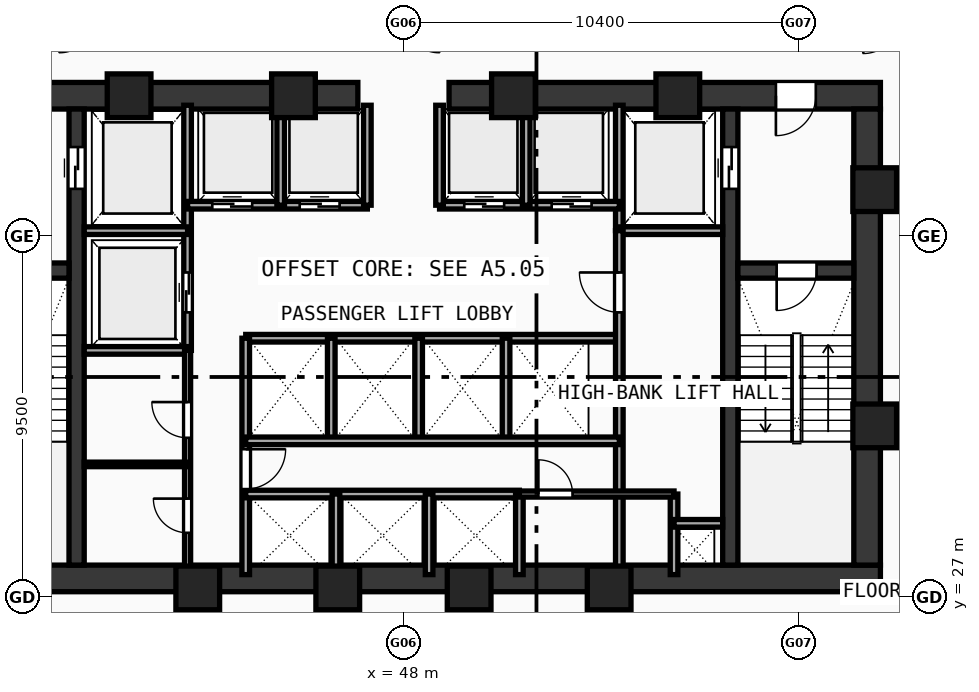
"""IFC4 building model, lengths in metres.
Left out: names, types, materials, properties, quantities, classifications, styles, units other than length and angle.
Written with IfcOpenShell. Run it as: python <this file> out.ifc"""

import sys

from ifc_helpers import new_model, si_unit, direction, frame, frame_2d, origin, origin_with_axes, origin_2d, place, context, subcontext, project, spatial, rectangle, hollow_rectangle, extrude, source, transform, mapped, element, fill, save


model = new_model("IFC4")
c1 = context("Model", 3, precision=1e-05, world=origin(), true_north=direction((0.0, 1.0)))
c2 = subcontext(c1, "Body", "Model", "MODEL_VIEW")
j1 = project(units=[si_unit("LENGTHUNIT", "METRE"), si_unit("PLANEANGLEUNIT", "RADIAN")], contexts=[c1])
p1 = place(None, origin())
s1 = spatial("IfcSite", under=j1, at=p1, CompositionType="ELEMENT")
p2 = place(p1, origin())
s2 = spatial("IfcBuilding", under=s1, at=p2, CompositionType="ELEMENT")
p3 = place(p2, frame((0.0, 0.0, 44.92)))
s3 = spatial("IfcBuildingStorey", under=s2, at=p3, CompositionType="ELEMENT", Elevation=44.92)
p4 = place(p3, frame((35.45, 27.5, 0.0), z_axis=(0.0, 0.0, 1.0), x_axis=(1.0, 0.0, 0.0)))
e1 = element("IfcWall", 1, at=p4, inside=s3, PredefinedType="SHEAR", context=c2, shape_type="SweptSolid", body=[
    extrude(rectangle(XDim=25.1, YDim=0.7, at=frame_2d((12.55, 0.0))), origin(), (0.0, 0.0, 1.0), 3.37),
])
p5 = place(p3, frame((35.45, 40.2, 0.0), z_axis=(0.0, 0.0, 1.0), x_axis=(1.0, 0.0, 0.0)))
e2 = element("IfcWall", 2, at=p5, inside=s3, PredefinedType="SHEAR", context=c2, shape_type="SweptSolid", body=[
    extrude(rectangle(XDim=11.35, YDim=0.7, at=frame_2d((5.675, 0.0))), origin(), (0.0, 0.0, 1.0), 3.37),
])
p6 = place(p5, frame((1.7, 0.0, 0.0)))
e3 = element("IfcOpeningElement", 3, at=p6, cuts=e2, PredefinedType="OPENING", context=c2, shape_type="SweptSolid", body=[
    extrude(rectangle(XDim=1.05, YDim=2.1, at=frame_2d((0.525, 1.05))), frame((0.0, 0.36, 0.0), z_axis=(0.0, -1.0, 0.0), x_axis=(1.0, 0.0, 0.0)), (0.0, 0.0, 1.0), 0.72),
])
p7 = place(p3, frame((49.2, 40.2, 0.0), z_axis=(0.0, 0.0, 1.0), x_axis=(1.0, 0.0, 0.0)))
e4 = element("IfcWall", 4, at=p7, inside=s3, PredefinedType="SHEAR", context=c2, shape_type="SweptSolid", body=[
    extrude(rectangle(XDim=11.35, YDim=0.7, at=frame_2d((5.675, 0.0))), origin(), (0.0, 0.0, 1.0), 3.37),
])
p8 = place(p7, frame((8.6, 0.0, 0.0)))
e5 = element("IfcOpeningElement", 5, at=p8, cuts=e4, PredefinedType="OPENING", context=c2, shape_type="SweptSolid", body=[
    extrude(rectangle(XDim=1.05, YDim=2.1, at=frame_2d((0.525, 1.05))), frame((0.0, 0.36, 0.0), z_axis=(0.0, -1.0, 0.0), x_axis=(1.0, 0.0, 0.0)), (0.0, 0.0, 1.0), 0.72),
])
p9 = place(p3, frame((60.2, 27.85, 0.0), z_axis=(0.0, 0.0, 1.0), x_axis=(0.0, 1.0, 0.0)))
e6 = element("IfcWall", 6, at=p9, inside=s3, PredefinedType="SHEAR", context=c2, shape_type="SweptSolid", body=[
    extrude(rectangle(XDim=12.0, YDim=0.7, at=frame_2d((6.0, 0.0))), origin(), (0.0, 0.0, 1.0), 3.37),
])
p10 = place(p3, frame((39.4, 27.85, 0.0), z_axis=(0.0, 0.0, 1.0), x_axis=(0.0, 1.0, 0.0)))
e7 = element("IfcWall", 7, at=p10, inside=s3, PredefinedType="SHEAR", context=c2, shape_type="SweptSolid", body=[
    extrude(rectangle(XDim=12.0, YDim=0.4, at=frame_2d((6.0, 0.0))), origin(), (0.0, 0.0, 1.0), 3.37),
])
p11 = place(p10, frame((9.9, 0.0, 0.0)))
e8 = element("IfcOpeningElement", 8, at=p11, cuts=e7, PredefinedType="OPENING", context=c2, shape_type="SweptSolid", body=[
    extrude(rectangle(XDim=1.1, YDim=2.1, at=frame_2d((0.55, 1.05))), frame((0.0, 0.21, 0.0), z_axis=(0.0, -1.0, 0.0), x_axis=(1.0, 0.0, 0.0)), (0.0, 0.0, 1.0), 0.42),
])
p12 = place(p3, frame((56.6, 27.85, 0.0), z_axis=(0.0, 0.0, 1.0), x_axis=(0.0, 1.0, 0.0)))
e9 = element("IfcWall", 9, at=p12, inside=s3, PredefinedType="SHEAR", context=c2, shape_type="SweptSolid", body=[
    extrude(rectangle(XDim=12.0, YDim=0.4, at=frame_2d((6.0, 0.0))), origin(), (0.0, 0.0, 1.0), 3.37),
])
p13 = place(p12, frame((9.9, 0.0, 0.0)))
e10 = element("IfcOpeningElement", 10, at=p13, cuts=e9, PredefinedType="OPENING", context=c2, shape_type="SweptSolid", body=[
    extrude(rectangle(XDim=1.1, YDim=2.1, at=frame_2d((0.55, 1.05))), frame((0.0, 0.21, 0.0), z_axis=(0.0, -1.0, 0.0), x_axis=(1.0, 0.0, 0.0)), (0.0, 0.0, 1.0), 0.42),
])
p14 = place(p3, frame((36.15, 35.6, 0.0), z_axis=(0.0, 0.0, 1.0), x_axis=(1.0, 0.0, 0.0)))
e11 = element("IfcWall", 11, at=p14, inside=s3, PredefinedType="SHEAR", context=c2, shape_type="SweptSolid", body=[
    extrude(rectangle(XDim=3.05, YDim=0.4, at=frame_2d((1.525, 0.0))), origin(), (0.0, 0.0, 1.0), 3.37),
])
p15 = place(p14, frame((0.97, 0.0, 0.0)))
e12 = element("IfcOpeningElement", 12, at=p15, cuts=e11, PredefinedType="OPENING", context=c2, shape_type="SweptSolid", body=[
    extrude(rectangle(XDim=1.05, YDim=2.1, at=frame_2d((0.525, 1.05))), frame((0.0, 0.21, 0.0), z_axis=(0.0, -1.0, 0.0), x_axis=(1.0, 0.0, 0.0)), (0.0, 0.0, 1.0), 0.42),
])
p16 = place(p3, frame((56.8, 35.6, 0.0), z_axis=(0.0, 0.0, 1.0), x_axis=(1.0, 0.0, 0.0)))
e13 = element("IfcWall", 13, at=p16, inside=s3, PredefinedType="SHEAR", context=c2, shape_type="SweptSolid", body=[
    extrude(rectangle(XDim=3.05, YDim=0.4, at=frame_2d((1.525, 0.0))), origin(), (0.0, 0.0, 1.0), 3.37),
])
p17 = place(p16, frame((1.02, 0.0, 0.0)))
e14 = element("IfcOpeningElement", 14, at=p17, cuts=e13, PredefinedType="OPENING", context=c2, shape_type="SweptSolid", body=[
    extrude(rectangle(XDim=1.05, YDim=2.1, at=frame_2d((0.525, 1.05))), frame((0.0, 0.21, 0.0), z_axis=(0.0, -1.0, 0.0), x_axis=(1.0, 0.0, 0.0)), (0.0, 0.0, 1.0), 0.42),
])
m1 = source(origin(), c2, "Body", "SweptSolid", [
    extrude(hollow_rectangle(XDim=1.15, YDim=1.15, WallThickness=0.048, at=origin_2d()), origin(), (0.0, 0.0, 1.0), 3.63),
])
for number, where, z_axis, x_axis in (
    (15, (42.588, 27.25, -0.26), (0.0, 0.0, 1.0), (1.0, 0.0, 0.0)),
    (16, (46.272, 27.25, -0.26), (0.0, 0.0, 1.0), (1.0, 0.0, 0.0)),
    (17, (49.729, 27.25, -0.26), (0.0, 0.0, 1.0), (1.0, 0.0, 0.0)),
    (18, (53.412, 27.25, -0.26), (0.0, 0.0, 1.0), (1.0, 0.0, 0.0)),
    (19, (60.4, 31.513, -0.26), (0.0, 0.0, 1.0), (1.0, 0.0, 0.0)),
    (20, (60.4, 37.729, -0.26), (0.0, 0.0, 1.0), (1.0, 0.0, 0.0)),
    (21, (55.219, 40.2, -0.26), (0.0, 0.0, 1.0), (1.0, 0.0, 0.0)),
    (22, (50.894, 40.2, -0.26), (0.0, 0.0, 1.0), (1.0, 0.0, 0.0)),
    (23, (45.106, 40.2, -0.26), (0.0, 0.0, 1.0), (1.0, 0.0, 0.0)),
    (24, (40.781, 40.2, -0.26), (0.0, 0.0, 1.0), (1.0, 0.0, 0.0)),
):
    element("IfcColumn", number, at=place(p3, frame(where, z_axis=z_axis, x_axis=x_axis)), inside=s3, PredefinedType="COLUMN", context=c2, shape_type="MappedRepresentation", body=[
        mapped(m1, transform((0.0, 0.0, 0.0), scale=1.0)),
    ])
p18 = place(p3, frame((42.32, 33.5, 0.0), z_axis=(0.0, 0.0, 1.0), x_axis=(0.0, 1.0, 0.0)))
e25 = element("IfcWall", 25, at=p18, inside=s3, PredefinedType="SOLIDWALL", context=c2, shape_type="SweptSolid", body=[
    extrude(rectangle(XDim=6.45, YDim=0.2, at=frame_2d((3.225, 0.0))), origin(), (0.0, 0.0, 1.0), 3.37),
])
p19 = place(p18, frame((1.0, 0.0, 0.0)))
e26 = element("IfcOpeningElement", 26, at=p19, cuts=e25, PredefinedType="OPENING", context=c2, shape_type="SweptSolid", body=[
    extrude(rectangle(XDim=1.05, YDim=2.1, at=frame_2d((0.525, 1.05))), frame((0.0, 0.11, 0.0), z_axis=(0.0, -1.0, 0.0), x_axis=(1.0, 0.0, 0.0)), (0.0, 0.0, 1.0), 0.22),
])
for number, where, z_axis, x_axis in (
    (27, (39.6, 36.65, 0.0), (0.0, 0.0, 1.0), (1.0, 0.0, 0.0)),
    (28, (39.6, 33.5, 0.0), (0.0, 0.0, 1.0), (1.0, 0.0, 0.0)),
):
    element("IfcWall", number, at=place(p3, frame(where, z_axis=z_axis, x_axis=x_axis)), inside=s3, PredefinedType="SOLIDWALL", context=c2, shape_type="SweptSolid", body=[
        extrude(rectangle(XDim=2.72, YDim=0.2, at=frame_2d((1.36, 0.0))), origin(), (0.0, 0.0, 1.0), 3.37),
    ])
p20 = place(p3, frame((53.68, 36.65, 0.0), z_axis=(0.0, 0.0, 1.0), x_axis=(0.0, 1.0, 0.0)))
e29 = element("IfcWall", 29, at=p20, inside=s3, PredefinedType="SOLIDWALL", context=c2, shape_type="SweptSolid", body=[
    extrude(rectangle(XDim=3.3, YDim=0.2, at=frame_2d((1.65, 0.0))), origin(), (0.0, 0.0, 1.0), 3.37),
])
p21 = place(p3, frame((53.68, 36.65, 0.0), z_axis=(0.0, 0.0, 1.0), x_axis=(1.0, 0.0, 0.0)))
e30 = element("IfcWall", 30, at=p21, inside=s3, PredefinedType="SOLIDWALL", context=c2, shape_type="SweptSolid", body=[
    extrude(rectangle(XDim=2.72, YDim=0.2, at=frame_2d((1.36, 0.0))), origin(), (0.0, 0.0, 1.0), 3.37),
])
p22 = place(p3, frame((42.32, 37.32, 0.0), z_axis=(0.0, 0.0, 1.0), x_axis=(1.0, 0.0, 0.0)))
e31 = element("IfcWall", 31, at=p22, inside=s3, PredefinedType="SOLIDWALL", context=c2, shape_type="SweptSolid", body=[
    extrude(rectangle(XDim=4.73, YDim=0.2, at=frame_2d((2.365, 0.0))), origin(), (0.0, 0.0, 1.0), 3.37),
])
p23 = place(p22, frame((0.65, 0.0, 0.0)))
e32 = element("IfcOpeningElement", 32, at=p23, cuts=e31, PredefinedType="OPENING", context=c2, shape_type="SweptSolid", body=[
    extrude(rectangle(XDim=1.05, YDim=2.1, at=frame_2d((0.525, 1.05))), frame((0.0, 0.11, 0.0), z_axis=(0.0, -1.0, 0.0), x_axis=(1.0, 0.0, 0.0)), (0.0, 0.0, 1.0), 0.22),
])
p24 = place(p22, frame((2.95, 0.0, 0.0)))
e33 = element("IfcOpeningElement", 33, at=p24, cuts=e31, PredefinedType="OPENING", context=c2, shape_type="SweptSolid", body=[
    extrude(rectangle(XDim=1.05, YDim=2.1, at=frame_2d((0.525, 1.05))), frame((0.0, 0.11, 0.0), z_axis=(0.0, -1.0, 0.0), x_axis=(1.0, 0.0, 0.0)), (0.0, 0.0, 1.0), 0.22),
])
p25 = place(p3, frame((48.95, 37.32, 0.0), z_axis=(0.0, 0.0, 1.0), x_axis=(1.0, 0.0, 0.0)))
e34 = element("IfcWall", 34, at=p25, inside=s3, PredefinedType="SOLIDWALL", context=c2, shape_type="SweptSolid", body=[
    extrude(rectangle(XDim=4.73, YDim=0.2, at=frame_2d((2.365, 0.0))), origin(), (0.0, 0.0, 1.0), 3.37),
])
p26 = place(p25, frame((0.65, 0.0, 0.0)))
e35 = element("IfcOpeningElement", 35, at=p26, cuts=e34, PredefinedType="OPENING", context=c2, shape_type="SweptSolid", body=[
    extrude(rectangle(XDim=1.05, YDim=2.1, at=frame_2d((0.525, 1.05))), frame((0.0, 0.11, 0.0), z_axis=(0.0, -1.0, 0.0), x_axis=(1.0, 0.0, 0.0)), (0.0, 0.0, 1.0), 0.22),
])
p27 = place(p25, frame((2.95, 0.0, 0.0)))
e36 = element("IfcOpeningElement", 36, at=p27, cuts=e34, PredefinedType="OPENING", context=c2, shape_type="SweptSolid", body=[
    extrude(rectangle(XDim=1.05, YDim=2.1, at=frame_2d((0.525, 1.05))), frame((0.0, 0.11, 0.0), z_axis=(0.0, -1.0, 0.0), x_axis=(1.0, 0.0, 0.0)), (0.0, 0.0, 1.0), 0.22),
])
for number, where, z_axis, x_axis in (
    (37, (47.05, 37.32, 0.0), (0.0, 0.0, 1.0), (0.0, 1.0, 0.0)),
    (38, (48.95, 37.32, 0.0), (0.0, 0.0, 1.0), (0.0, 1.0, 0.0)),
    (39, (44.77, 37.32, 0.0), (0.0, 0.0, 1.0), (0.0, 1.0, 0.0)),
    (40, (51.23, 37.32, 0.0), (0.0, 0.0, 1.0), (0.0, 1.0, 0.0)),
):
    element("IfcWall", number, at=place(p3, frame(where, z_axis=z_axis, x_axis=x_axis)), inside=s3, PredefinedType="SOLIDWALL", context=c2, shape_type="SweptSolid", body=[
        extrude(rectangle(XDim=2.63, YDim=0.2, at=frame_2d((1.315, 0.0))), origin(), (0.0, 0.0, 1.0), 3.37),
    ])
p28 = place(p3, frame((43.85, 33.82, 0.0), z_axis=(0.0, 0.0, 1.0), x_axis=(1.0, 0.0, 0.0)))
e41 = element("IfcWall", 41, at=p28, inside=s3, PredefinedType="SOLIDWALL", context=c2, shape_type="SweptSolid", body=[
    extrude(rectangle(XDim=9.83, YDim=0.2, at=frame_2d((4.915, 0.0))), origin(), (0.0, 0.0, 1.0), 3.37),
])
p29 = place(p3, frame((43.85, 27.6, 0.0), z_axis=(0.0, 0.0, 1.0), x_axis=(0.0, 1.0, 0.0)))
e42 = element("IfcWall", 42, at=p29, inside=s3, PredefinedType="SOLIDWALL", context=c2, shape_type="SweptSolid", body=[
    extrude(rectangle(XDim=6.22, YDim=0.2, at=frame_2d((3.11, 0.0))), origin(), (0.0, 0.0, 1.0), 3.37),
])
p30 = place(p29, frame((2.25, 0.0, 0.0)))
e43 = element("IfcOpeningElement", 43, at=p30, cuts=e42, PredefinedType="OPENING", context=c2, shape_type="SweptSolid", body=[
    extrude(rectangle(XDim=1.05, YDim=2.1, at=frame_2d((0.525, 1.05))), frame((0.0, 0.11, 0.0), z_axis=(0.0, -1.0, 0.0), x_axis=(1.0, 0.0, 0.0)), (0.0, 0.0, 1.0), 0.22),
])
p31 = place(p3, frame((53.68, 27.6, 0.0), z_axis=(0.0, 0.0, 1.0), x_axis=(0.0, 1.0, 0.0)))
e44 = element("IfcWall", 44, at=p31, inside=s3, PredefinedType="SOLIDWALL", context=c2, shape_type="SweptSolid", body=[
    extrude(rectangle(XDim=9.05, YDim=0.2, at=frame_2d((4.525, 0.0))), origin(), (0.0, 0.0, 1.0), 3.37),
])
p32 = place(p31, frame((6.9, 0.0, 0.0)))
e45 = element("IfcOpeningElement", 45, at=p32, cuts=e44, PredefinedType="OPENING", context=c2, shape_type="SweptSolid", body=[
    extrude(rectangle(XDim=1.05, YDim=2.1, at=frame_2d((0.525, 1.05))), frame((0.0, 0.11, 0.0), z_axis=(0.0, -1.0, 0.0), x_axis=(1.0, 0.0, 0.0)), (0.0, 0.0, 1.0), 0.22),
])
for number, where, z_axis, x_axis in (
    (46, (46.1, 31.12, 0.0), (0.0, 0.0, 1.0), (0.0, 1.0, 0.0)),
    (47, (48.4, 31.12, 0.0), (0.0, 0.0, 1.0), (0.0, 1.0, 0.0)),
    (48, (50.7, 31.12, 0.0), (0.0, 0.0, 1.0), (0.0, 1.0, 0.0)),
):
    element("IfcWall", number, at=place(p3, frame(where, z_axis=z_axis, x_axis=x_axis)), inside=s3, PredefinedType="SOLIDWALL", context=c2, shape_type="SweptSolid", body=[
        extrude(rectangle(XDim=2.7, YDim=0.2, at=frame_2d((1.35, 0.0))), origin(), (0.0, 0.0, 1.0), 3.37),
    ])
p33 = place(p3, frame((43.85, 29.72, 0.0), z_axis=(0.0, 0.0, 1.0), x_axis=(1.0, 0.0, 0.0)))
e49 = element("IfcWall", 49, at=p33, inside=s3, PredefinedType="SOLIDWALL", context=c2, shape_type="SweptSolid", body=[
    extrude(rectangle(XDim=7.2, YDim=0.2, at=frame_2d((3.6, 0.0))), origin(), (0.0, 0.0, 1.0), 3.37),
])
p34 = place(p3, frame((51.05, 27.6, 0.0), z_axis=(0.0, 0.0, 1.0), x_axis=(0.0, 1.0, 0.0)))
e50 = element("IfcWall", 50, at=p34, inside=s3, PredefinedType="SOLIDWALL", context=c2, shape_type="SweptSolid", body=[
    extrude(rectangle(XDim=2.12, YDim=0.2, at=frame_2d((1.06, 0.0))), origin(), (0.0, 0.0, 1.0), 3.37),
])
p35 = place(p3, frame((43.85, 31.12, 0.0), z_axis=(0.0, 0.0, 1.0), x_axis=(1.0, 0.0, 0.0)))
e51 = element("IfcWall", 51, at=p35, inside=s3, PredefinedType="SOLIDWALL", context=c2, shape_type="SweptSolid", body=[
    extrude(rectangle(XDim=9.83, YDim=0.2, at=frame_2d((4.915, 0.0))), origin(), (0.0, 0.0, 1.0), 3.37),
])
for number, where, z_axis, x_axis in (
    (52, (46.225, 27.6, 0.0), (0.0, 0.0, 1.0), (0.0, 1.0, 0.0)),
    (53, (48.675, 27.6, 0.0), (0.0, 0.0, 1.0), (0.0, 1.0, 0.0)),
    (54, (55.12, 27.6, 0.0), (0.0, 0.0, 1.0), (0.0, 1.0, 0.0)),
):
    element("IfcWall", number, at=place(p3, frame(where, z_axis=z_axis, x_axis=x_axis)), inside=s3, PredefinedType="SOLIDWALL", context=c2, shape_type="SweptSolid", body=[
        extrude(rectangle(XDim=2.12, YDim=0.2, at=frame_2d((1.06, 0.0))), origin(), (0.0, 0.0, 1.0), 3.37),
    ])
p36 = place(p3, frame((55.12, 28.95, 0.0), z_axis=(0.0, 0.0, 1.0), x_axis=(1.0, 0.0, 0.0)))
e55 = element("IfcWall", 55, at=p36, inside=s3, PredefinedType="SOLIDWALL", context=c2, shape_type="SweptSolid", body=[
    extrude(rectangle(XDim=1.28, YDim=0.2, at=frame_2d((0.64, 0.0))), origin(), (0.0, 0.0, 1.0), 3.37),
])
p37 = place(p3, frame((42.32, 27.6, 0.0), z_axis=(0.0, 0.0, 1.0), x_axis=(0.0, 1.0, 0.0)))
e56 = element("IfcWall", 56, at=p37, inside=s3, PredefinedType="PARTITIONING", context=c2, shape_type="SweptSolid", body=[
    extrude(rectangle(XDim=5.9, YDim=0.16, at=frame_2d((2.95, 0.0))), origin(), (0.0, 0.0, 1.0), 3.37),
])
p38 = place(p37, frame((1.1, 0.0, 0.0)))
e57 = element("IfcOpeningElement", 57, at=p38, cuts=e56, PredefinedType="OPENING", context=c2, shape_type="SweptSolid", body=[
    extrude(rectangle(XDim=0.9, YDim=2.1, at=frame_2d((0.45, 1.05))), frame((0.0, 0.09, 0.0), z_axis=(0.0, -1.0, 0.0), x_axis=(1.0, 0.0, 0.0)), (0.0, 0.0, 1.0), 0.18),
])
p39 = place(p37, frame((3.6, 0.0, 0.0)))
e58 = element("IfcOpeningElement", 58, at=p39, cuts=e56, PredefinedType="OPENING", context=c2, shape_type="SweptSolid", body=[
    extrude(rectangle(XDim=0.94, YDim=2.1, at=frame_2d((0.47, 1.05))), frame((0.0, 0.09, 0.0), z_axis=(0.0, -1.0, 0.0), x_axis=(1.0, 0.0, 0.0)), (0.0, 0.0, 1.0), 0.18),
])
p40 = place(p3, frame((51.05, 29.72, 0.0), z_axis=(0.0, 0.0, 1.0), x_axis=(1.0, 0.0, 0.0)))
e59 = element("IfcWall", 59, at=p40, inside=s3, PredefinedType="PARTITIONING", context=c2, shape_type="SweptSolid", body=[
    extrude(rectangle(XDim=4.07, YDim=0.16, at=frame_2d((2.035, 0.0))), origin(), (0.0, 0.0, 1.0), 3.37),
])
p41 = place(p40, frame((0.5, 0.0, 0.0)))
e60 = element("IfcOpeningElement", 60, at=p41, cuts=e59, PredefinedType="OPENING", context=c2, shape_type="SweptSolid", body=[
    extrude(rectangle(XDim=0.9, YDim=2.1, at=frame_2d((0.45, 1.05))), frame((0.0, 0.09, 0.0), z_axis=(0.0, -1.0, 0.0), x_axis=(1.0, 0.0, 0.0)), (0.0, 0.0, 1.0), 0.18),
])
p42 = place(p3, frame((39.6, 30.5, 0.0), z_axis=(0.0, 0.0, 1.0), x_axis=(1.0, 0.0, 0.0)))
e61 = element("IfcWall", 61, at=p42, inside=s3, PredefinedType="PARTITIONING", context=c2, shape_type="SweptSolid", body=[
    extrude(rectangle(XDim=2.72, YDim=0.12, at=frame_2d((1.36, 0.0))), origin(), (0.0, 0.0, 1.0), 3.37),
])
m2 = source(origin(), c2, "Body", "SweptSolid", [
    extrude(rectangle(XDim=1.05, YDim=2.1, at=frame_2d((0.525, 1.05))), frame((0.0, 0.025, 0.0), z_axis=(0.0, -1.0, 0.0), x_axis=(1.0, 0.0, 0.0)), (0.0, 0.0, 1.0), 0.05),
])
p43 = place(p17, frame((1.05, 0.0, 0.0), z_axis=(0.0, 0.0, 1.0), x_axis=(-1.0, 0.0, 0.0)))
e62 = element("IfcDoor", 62, at=p43, inside=s3, OperationType="SINGLE_SWING_RIGHT", PredefinedType="DOOR", context=c2, shape_type="MappedRepresentation", body=[
    mapped(m2, transform((0.0, 0.0, 0.0), scale=1.0)),
])
fill(e14, e62)
p44 = place(p8, frame((1.05, 0.0, 0.0), z_axis=(0.0, 0.0, 1.0), x_axis=(-1.0, 0.0, 0.0)))
e63 = element("IfcDoor", 63, at=p44, inside=s3, OperationType="SINGLE_SWING_RIGHT", PredefinedType="DOOR", context=c2, shape_type="MappedRepresentation", body=[
    mapped(m2, transform((0.0, 0.0, 0.0), scale=1.0)),
])
fill(e5, e63)
m3 = source(origin(), c2, "Body", "SweptSolid", [
    extrude(rectangle(XDim=1.1, YDim=2.1, at=frame_2d((0.55, 1.05))), frame((0.0, 0.025, 0.0), z_axis=(0.0, -1.0, 0.0), x_axis=(1.0, 0.0, 0.0)), (0.0, 0.0, 1.0), 0.05),
])
p45 = place(p11, frame((1.1, 0.0, 0.0), z_axis=(0.0, 0.0, 1.0), x_axis=(-1.0, 0.0, 0.0)))
e64 = element("IfcDoor", 64, at=p45, inside=s3, OperationType="DOUBLE_DOOR_SLIDING", PredefinedType="DOOR", context=c2, shape_type="MappedRepresentation", body=[
    mapped(m3, transform((0.0, 0.0, 0.0), scale=1.0)),
])
fill(e8, e64)
p46 = place(p13, origin_with_axes())
e65 = element("IfcDoor", 65, at=p46, inside=s3, OperationType="DOUBLE_DOOR_SLIDING", PredefinedType="DOOR", context=c2, shape_type="MappedRepresentation", body=[
    mapped(m3, transform((0.0, 0.0, 0.0), scale=1.0)),
])
fill(e10, e65)
p47 = place(p19, origin_with_axes())
e66 = element("IfcDoor", 66, at=p47, inside=s3, OperationType="DOUBLE_DOOR_SLIDING", PredefinedType="DOOR", context=c2, shape_type="MappedRepresentation", body=[
    mapped(m2, transform((0.0, 0.0, 0.0), scale=1.0)),
])
fill(e26, e66)
p48 = place(p23, frame((1.05, 0.0, 0.0), z_axis=(0.0, 0.0, 1.0), x_axis=(-1.0, 0.0, 0.0)))
e67 = element("IfcDoor", 67, at=p48, inside=s3, OperationType="DOUBLE_DOOR_SLIDING", PredefinedType="DOOR", context=c2, shape_type="MappedRepresentation", body=[
    mapped(m2, transform((0.0, 0.0, 0.0), scale=1.0)),
])
fill(e32, e67)
p49 = place(p24, frame((1.05, 0.0, 0.0), z_axis=(0.0, 0.0, 1.0), x_axis=(-1.0, 0.0, 0.0)))
e68 = element("IfcDoor", 68, at=p49, inside=s3, OperationType="DOUBLE_DOOR_SLIDING", PredefinedType="DOOR", context=c2, shape_type="MappedRepresentation", body=[
    mapped(m2, transform((0.0, 0.0, 0.0), scale=1.0)),
])
fill(e33, e68)
p50 = place(p26, frame((1.05, 0.0, 0.0), z_axis=(0.0, 0.0, 1.0), x_axis=(-1.0, 0.0, 0.0)))
e69 = element("IfcDoor", 69, at=p50, inside=s3, OperationType="DOUBLE_DOOR_SLIDING", PredefinedType="DOOR", context=c2, shape_type="MappedRepresentation", body=[
    mapped(m2, transform((0.0, 0.0, 0.0), scale=1.0)),
])
fill(e35, e69)
p51 = place(p27, frame((1.05, 0.0, 0.0), z_axis=(0.0, 0.0, 1.0), x_axis=(-1.0, 0.0, 0.0)))
e70 = element("IfcDoor", 70, at=p51, inside=s3, OperationType="DOUBLE_DOOR_SLIDING", PredefinedType="DOOR", context=c2, shape_type="MappedRepresentation", body=[
    mapped(m2, transform((0.0, 0.0, 0.0), scale=1.0)),
])
fill(e36, e70)
p52 = place(p30, frame((1.05, 0.0, 0.0), z_axis=(0.0, 0.0, 1.0), x_axis=(-1.0, 0.0, 0.0)))
e71 = element("IfcDoor", 71, at=p52, inside=s3, OperationType="SINGLE_SWING_LEFT", PredefinedType="DOOR", context=c2, shape_type="MappedRepresentation", body=[
    mapped(m2, transform((0.0, 0.0, 0.0), scale=1.0)),
])
fill(e43, e71)
p53 = place(p32, origin_with_axes())
e72 = element("IfcDoor", 72, at=p53, inside=s3, OperationType="SINGLE_SWING_RIGHT", PredefinedType="DOOR", context=c2, shape_type="MappedRepresentation", body=[
    mapped(m2, transform((0.0, 0.0, 0.0), scale=1.0)),
])
fill(e45, e72)
m4 = source(origin(), c2, "Body", "SweptSolid", [
    extrude(rectangle(XDim=0.9, YDim=2.1, at=frame_2d((0.45, 1.05))), frame((0.0, 0.025, 0.0), z_axis=(0.0, -1.0, 0.0), x_axis=(1.0, 0.0, 0.0)), (0.0, 0.0, 1.0), 0.05),
])
p54 = place(p38, origin_with_axes())
e73 = element("IfcDoor", 73, at=p54, inside=s3, OperationType="SINGLE_SWING_RIGHT", PredefinedType="DOOR", context=c2, shape_type="MappedRepresentation", body=[
    mapped(m4, transform((0.0, 0.0, 0.0), scale=1.0)),
])
fill(e57, e73)
m5 = source(origin(), c2, "Body", "SweptSolid", [
    extrude(rectangle(XDim=0.94, YDim=2.1, at=frame_2d((0.47, 1.05))), frame((0.0, 0.025, 0.0), z_axis=(0.0, -1.0, 0.0), x_axis=(1.0, 0.0, 0.0)), (0.0, 0.0, 1.0), 0.05),
])
p55 = place(p39, origin_with_axes())
e74 = element("IfcDoor", 74, at=p55, inside=s3, OperationType="SINGLE_SWING_RIGHT", PredefinedType="DOOR", context=c2, shape_type="MappedRepresentation", body=[
    mapped(m5, transform((0.0, 0.0, 0.0), scale=1.0)),
])
fill(e58, e74)
p56 = place(p41, origin_with_axes())
e75 = element("IfcDoor", 75, at=p56, inside=s3, OperationType="SINGLE_SWING_LEFT", PredefinedType="DOOR", context=c2, shape_type="MappedRepresentation", body=[
    mapped(m4, transform((0.0, 0.0, 0.0), scale=1.0)),
])
fill(e60, e75)
save(model, sys.argv[1])
